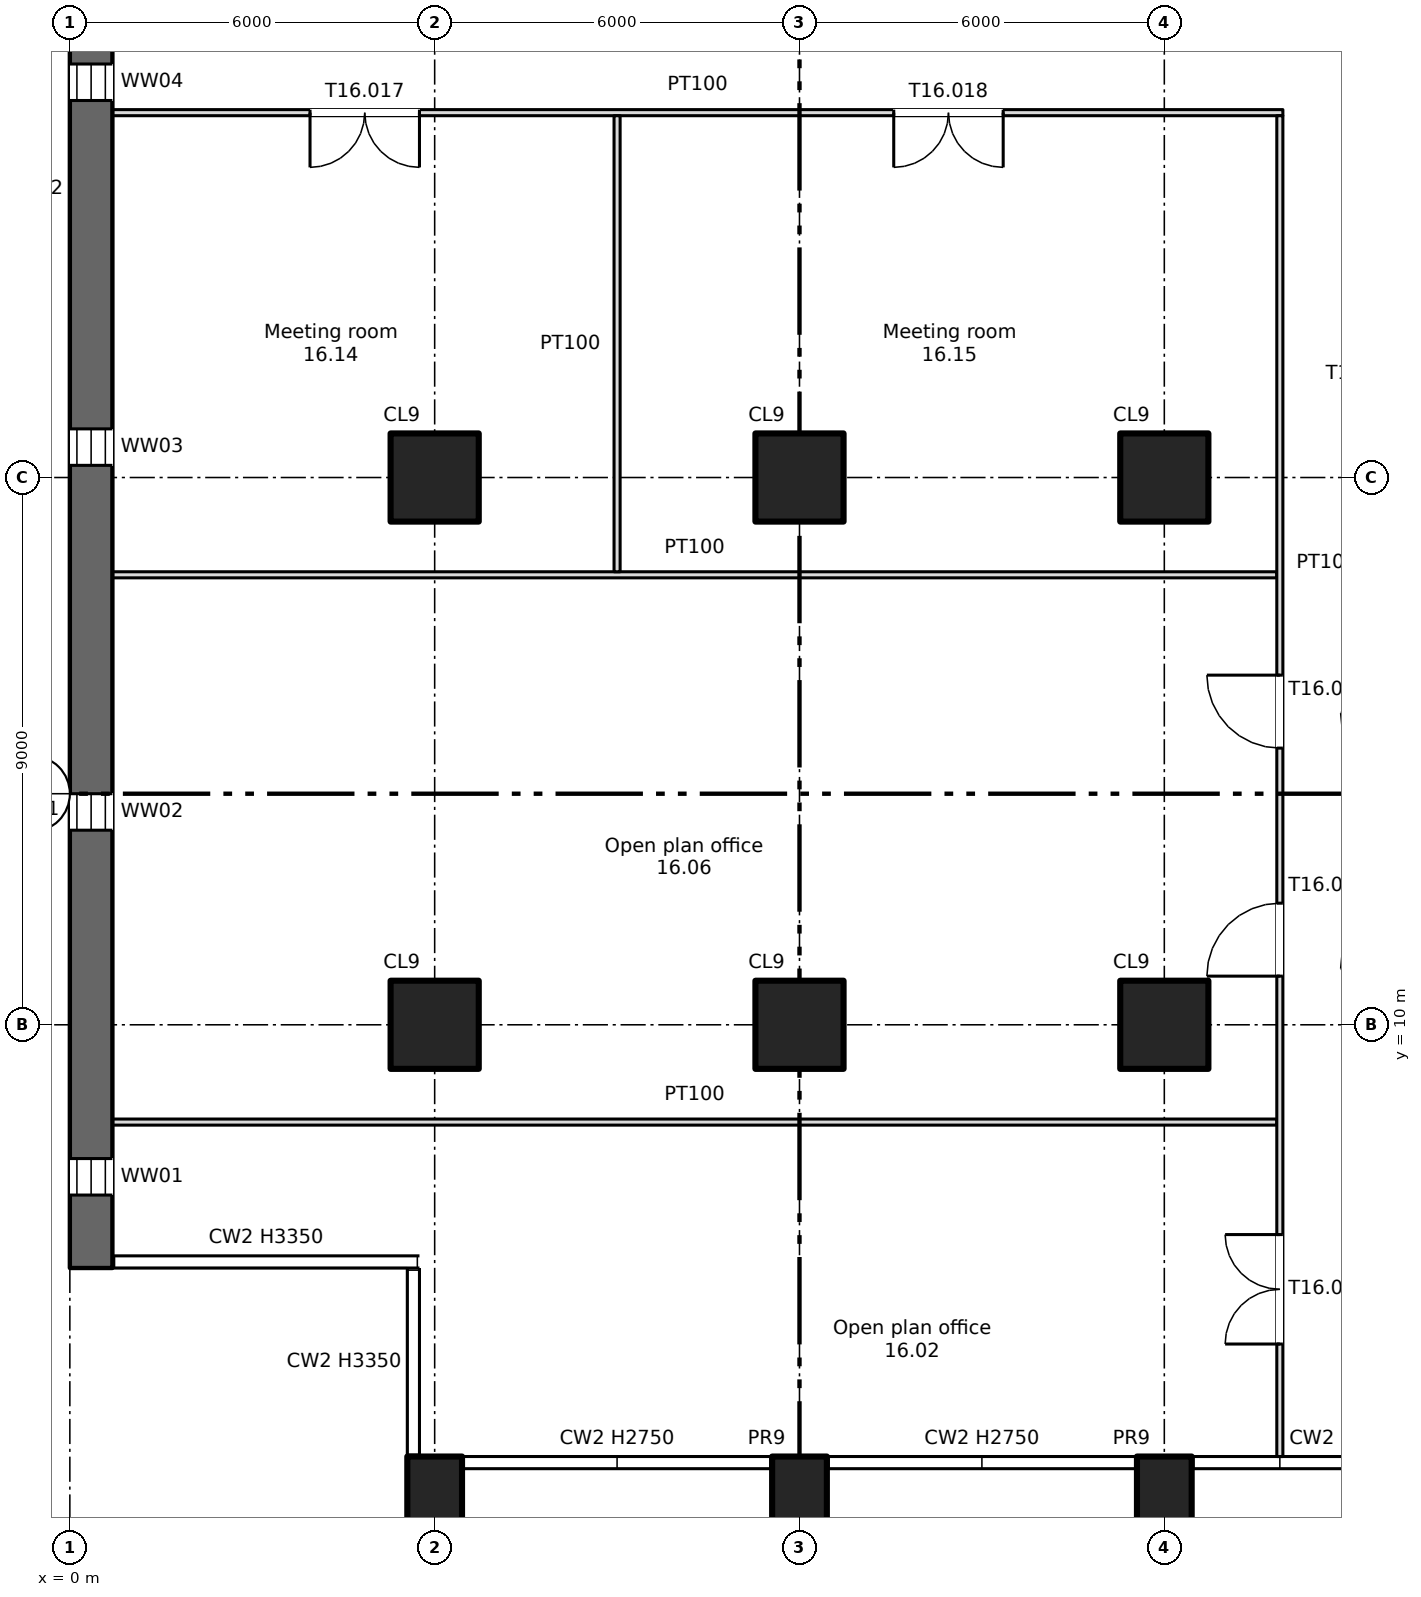
"""IFC4 building model, lengths in metres.
Left out: names, types, materials, properties, quantities, classifications, styles, units other than length and angle.
Written with IfcOpenShell. Run it as: python <this file> out.ifc"""

import sys

from ifc_helpers import new_model, si_unit, direction, frame, frame_2d, origin, origin_2d, place, context, subcontext, project, spatial, rectangle, extrude, element, fill, save


model = new_model("IFC4")
c1 = context("Model", 3, precision=1e-05, world=origin(), true_north=direction((0.0, 1.0)))
c2 = subcontext(c1, "Body", "Model", "MODEL_VIEW")
j1 = project(units=[si_unit("LENGTHUNIT", "METRE"), si_unit("PLANEANGLEUNIT", "RADIAN")], contexts=[c1])
p1 = place(None, origin())
s1 = spatial("IfcSite", under=j1, at=p1, CompositionType="ELEMENT")
p2 = place(p1, origin())
s2 = spatial("IfcBuilding", under=s1, at=p2, CompositionType="ELEMENT")
p3 = place(p2, frame((0.0, 0.0, 98.75)))
s3 = spatial("IfcBuildingStorey", under=s2, at=p3, CompositionType="ELEMENT", Elevation=98.75)
for number, where, z_axis, x_axis in (
    (1, (6.0, 2.2, -0.4), (0.0, 0.0, 1.0), (1.0, 0.0, 0.0)),
    (2, (12.0, 2.2, -0.4), (0.0, 0.0, 1.0), (1.0, 0.0, 0.0)),
    (3, (18.0, 2.2, -0.4), (0.0, 0.0, 1.0), (1.0, 0.0, 0.0)),
):
    element("IfcColumn", number, at=place(p3, frame(where, z_axis=z_axis, x_axis=x_axis)), inside=s3, PredefinedType="COLUMN", context=c2, shape_type="SweptSolid", body=[
        extrude(rectangle(XDim=0.9, YDim=1.4, at=origin_2d()), origin(), (0.0, 0.0, 1.0), 3.75),
    ])
for number, where, z_axis, x_axis in (
    (4, (6.0, 10.0, 0.0), (0.0, 0.0, 1.0), (1.0, 0.0, 0.0)),
    (5, (6.0, 19.0, 0.0), (0.0, 0.0, 1.0), (1.0, 0.0, 0.0)),
    (6, (12.0, 10.0, 0.0), (0.0, 0.0, 1.0), (1.0, 0.0, 0.0)),
    (7, (12.0, 19.0, 0.0), (0.0, 0.0, 1.0), (1.0, 0.0, 0.0)),
    (8, (18.0, 10.0, 0.0), (0.0, 0.0, 1.0), (1.0, 0.0, 0.0)),
    (9, (18.0, 19.0, 0.0), (0.0, 0.0, 1.0), (1.0, 0.0, 0.0)),
):
    element("IfcColumn", number, at=place(p3, frame(where, z_axis=z_axis, x_axis=x_axis)), inside=s3, PredefinedType="COLUMN", context=c2, shape_type="SweptSolid", body=[
        extrude(rectangle(XDim=1.45, YDim=1.45, at=origin_2d()), origin(), (0.0, 0.0, 1.0), 3.35),
    ])
p4 = place(p3, frame((0.35, 6.0, 0.0), z_axis=(0.0, 0.0, 1.0), x_axis=(0.0, 1.0, 0.0)))
e10 = element("IfcWall", 10, at=p4, inside=s3, PredefinedType="SHEAR", context=c2, shape_type="SweptSolid", body=[
    extrude(rectangle(XDim=35.5, YDim=0.7, at=frame_2d((17.75, 0.0))), origin(), (0.0, 0.0, 1.0), 3.35),
])
p5 = place(p4, frame((1.2, 0.0, 0.6)))
e11 = element("IfcOpeningElement", 11, at=p5, cuts=e10, PredefinedType="OPENING", context=c2, shape_type="SweptSolid", body=[
    extrude(rectangle(XDim=0.6, YDim=2.4, at=frame_2d((0.3, 1.2))), frame((0.0, 0.36, 0.0), z_axis=(0.0, -1.0, 0.0), x_axis=(1.0, 0.0, 0.0)), (0.0, 0.0, 1.0), 0.72),
])
p6 = place(p4, frame((7.2, 0.0, 0.6)))
e12 = element("IfcOpeningElement", 12, at=p6, cuts=e10, PredefinedType="OPENING", context=c2, shape_type="SweptSolid", body=[
    extrude(rectangle(XDim=0.6, YDim=2.4, at=frame_2d((0.3, 1.2))), frame((0.0, 0.36, 0.0), z_axis=(0.0, -1.0, 0.0), x_axis=(1.0, 0.0, 0.0)), (0.0, 0.0, 1.0), 0.72),
])
p7 = place(p4, frame((13.2, 0.0, 0.6)))
e13 = element("IfcOpeningElement", 13, at=p7, cuts=e10, PredefinedType="OPENING", context=c2, shape_type="SweptSolid", body=[
    extrude(rectangle(XDim=0.6, YDim=2.4, at=frame_2d((0.3, 1.2))), frame((0.0, 0.36, 0.0), z_axis=(0.0, -1.0, 0.0), x_axis=(1.0, 0.0, 0.0)), (0.0, 0.0, 1.0), 0.72),
])
p8 = place(p4, frame((19.2, 0.0, 0.6)))
e14 = element("IfcOpeningElement", 14, at=p8, cuts=e10, PredefinedType="OPENING", context=c2, shape_type="SweptSolid", body=[
    extrude(rectangle(XDim=0.6, YDim=2.4, at=frame_2d((0.3, 1.2))), frame((0.0, 0.36, 0.0), z_axis=(0.0, -1.0, 0.0), x_axis=(1.0, 0.0, 0.0)), (0.0, 0.0, 1.0), 0.72),
])
p9 = place(p4, frame((25.2, 0.0, 0.6)))
e15 = element("IfcOpeningElement", 15, at=p9, cuts=e10, PredefinedType="OPENING", context=c2, shape_type="SweptSolid", body=[
    extrude(rectangle(XDim=0.6, YDim=2.4, at=frame_2d((0.3, 1.2))), frame((0.0, 0.36, 0.0), z_axis=(0.0, -1.0, 0.0), x_axis=(1.0, 0.0, 0.0)), (0.0, 0.0, 1.0), 0.72),
])
p10 = place(p4, frame((31.2, 0.0, 0.6)))
e16 = element("IfcOpeningElement", 16, at=p10, cuts=e10, PredefinedType="OPENING", context=c2, shape_type="SweptSolid", body=[
    extrude(rectangle(XDim=0.6, YDim=2.4, at=frame_2d((0.3, 1.2))), frame((0.0, 0.36, 0.0), z_axis=(0.0, -1.0, 0.0), x_axis=(1.0, 0.0, 0.0)), (0.0, 0.0, 1.0), 0.72),
])
for number, where, z_axis, x_axis in (
    (17, (0.7, 8.4, 0.0), (0.0, 0.0, 1.0), (1.0, 0.0, 0.0)),
    (18, (0.7, 17.4, 0.0), (0.0, 0.0, 1.0), (1.0, 0.0, 0.0)),
):
    element("IfcWall", number, at=place(p3, frame(where, z_axis=z_axis, x_axis=x_axis)), inside=s3, PredefinedType="PARTITIONING", context=c2, shape_type="SweptSolid", body=[
        extrude(rectangle(XDim=19.15, YDim=0.1, at=frame_2d((9.575, 0.0))), origin(), (0.0, 0.0, 1.0), 3.35),
    ])
p11 = place(p3, frame((0.7, 25.0, 0.0), z_axis=(0.0, 0.0, 1.0), x_axis=(1.0, 0.0, 0.0)))
e19 = element("IfcWall", 19, at=p11, inside=s3, PredefinedType="PARTITIONING", context=c2, shape_type="SweptSolid", body=[
    extrude(rectangle(XDim=19.25, YDim=0.1, at=frame_2d((9.625, 0.0))), origin(), (0.0, 0.0, 1.0), 3.35),
])
p12 = place(p11, frame((3.25, 0.0, 0.0)))
e20 = element("IfcOpeningElement", 20, at=p12, cuts=e19, PredefinedType="OPENING", context=c2, shape_type="SweptSolid", body=[
    extrude(rectangle(XDim=1.8, YDim=2.1, at=frame_2d((0.9, 1.05))), frame((0.0, 0.06, 0.0), z_axis=(0.0, -1.0, 0.0), x_axis=(1.0, 0.0, 0.0)), (0.0, 0.0, 1.0), 0.12),
])
p13 = place(p11, frame((12.85, 0.0, 0.0)))
e21 = element("IfcOpeningElement", 21, at=p13, cuts=e19, PredefinedType="OPENING", context=c2, shape_type="SweptSolid", body=[
    extrude(rectangle(XDim=1.8, YDim=2.1, at=frame_2d((0.9, 1.05))), frame((0.0, 0.06, 0.0), z_axis=(0.0, -1.0, 0.0), x_axis=(1.0, 0.0, 0.0)), (0.0, 0.0, 1.0), 0.12),
])
p14 = place(p3, frame((9.0, 17.45, 0.0), z_axis=(0.0, 0.0, 1.0), x_axis=(0.0, 1.0, 0.0)))
e22 = element("IfcWall", 22, at=p14, inside=s3, PredefinedType="PARTITIONING", context=c2, shape_type="SweptSolid", body=[
    extrude(rectangle(XDim=7.5, YDim=0.1, at=frame_2d((3.75, 0.0))), origin(), (0.0, 0.0, 1.0), 3.35),
])
p15 = place(p3, frame((19.9, 2.9, 0.0), z_axis=(0.0, 0.0, 1.0), x_axis=(0.0, 1.0, 0.0)))
e23 = element("IfcWall", 23, at=p15, inside=s3, PredefinedType="PARTITIONING", context=c2, shape_type="SweptSolid", body=[
    extrude(rectangle(XDim=22.05, YDim=0.1, at=frame_2d((11.025, 0.0))), origin(), (0.0, 0.0, 1.0), 3.35),
])
p16 = place(p15, frame((1.85, 0.0, 0.0)))
e24 = element("IfcOpeningElement", 24, at=p16, cuts=e23, PredefinedType="OPENING", context=c2, shape_type="SweptSolid", body=[
    extrude(rectangle(XDim=1.8, YDim=2.1, at=frame_2d((0.9, 1.05))), frame((0.0, 0.06, 0.0), z_axis=(0.0, -1.0, 0.0), x_axis=(1.0, 0.0, 0.0)), (0.0, 0.0, 1.0), 0.12),
])
p17 = place(p15, frame((7.9, 0.0, 0.0)))
e25 = element("IfcOpeningElement", 25, at=p17, cuts=e23, PredefinedType="OPENING", context=c2, shape_type="SweptSolid", body=[
    extrude(rectangle(XDim=1.2, YDim=2.1, at=frame_2d((0.6, 1.05))), frame((0.0, 0.06, 0.0), z_axis=(0.0, -1.0, 0.0), x_axis=(1.0, 0.0, 0.0)), (0.0, 0.0, 1.0), 0.12),
])
p18 = place(p15, frame((11.65, 0.0, 0.0)))
e26 = element("IfcOpeningElement", 26, at=p18, cuts=e23, PredefinedType="OPENING", context=c2, shape_type="SweptSolid", body=[
    extrude(rectangle(XDim=1.2, YDim=2.1, at=frame_2d((0.6, 1.05))), frame((0.0, 0.06, 0.0), z_axis=(0.0, -1.0, 0.0), x_axis=(1.0, 0.0, 0.0)), (0.0, 0.0, 1.0), 0.12),
])
p19 = place(p5, origin())
e27 = element("IfcWindow", 27, at=p19, inside=s3, PartitioningType="SINGLE_PANEL", PredefinedType="WINDOW", context=c2, shape_type="SweptSolid", body=[
    extrude(rectangle(XDim=0.6, YDim=2.4, at=frame_2d((0.3, 1.2))), frame((0.0, 0.03, 0.0), z_axis=(0.0, -1.0, 0.0), x_axis=(1.0, 0.0, 0.0)), (0.0, 0.0, 1.0), 0.06),
])
fill(e11, e27)
p20 = place(p6, origin())
e28 = element("IfcWindow", 28, at=p20, inside=s3, PartitioningType="SINGLE_PANEL", PredefinedType="WINDOW", context=c2, shape_type="SweptSolid", body=[
    extrude(rectangle(XDim=0.6, YDim=2.4, at=frame_2d((0.3, 1.2))), frame((0.0, 0.03, 0.0), z_axis=(0.0, -1.0, 0.0), x_axis=(1.0, 0.0, 0.0)), (0.0, 0.0, 1.0), 0.06),
])
fill(e12, e28)
p21 = place(p7, origin())
e29 = element("IfcWindow", 29, at=p21, inside=s3, PartitioningType="SINGLE_PANEL", PredefinedType="WINDOW", context=c2, shape_type="SweptSolid", body=[
    extrude(rectangle(XDim=0.6, YDim=2.4, at=frame_2d((0.3, 1.2))), frame((0.0, 0.03, 0.0), z_axis=(0.0, -1.0, 0.0), x_axis=(1.0, 0.0, 0.0)), (0.0, 0.0, 1.0), 0.06),
])
fill(e13, e29)
p22 = place(p8, origin())
e30 = element("IfcWindow", 30, at=p22, inside=s3, PartitioningType="SINGLE_PANEL", PredefinedType="WINDOW", context=c2, shape_type="SweptSolid", body=[
    extrude(rectangle(XDim=0.6, YDim=2.4, at=frame_2d((0.3, 1.2))), frame((0.0, 0.03, 0.0), z_axis=(0.0, -1.0, 0.0), x_axis=(1.0, 0.0, 0.0)), (0.0, 0.0, 1.0), 0.06),
])
fill(e14, e30)
p23 = place(p16, origin())
e31 = element("IfcDoor", 31, at=p23, inside=s3, OperationType="DOUBLE_DOOR_SINGLE_SWING", PredefinedType="DOOR", context=c2, shape_type="SweptSolid", body=[
    extrude(rectangle(XDim=1.8, YDim=2.1, at=frame_2d((0.9, 1.05))), frame((0.0, 0.025, 0.0), z_axis=(0.0, -1.0, 0.0), x_axis=(1.0, 0.0, 0.0)), (0.0, 0.0, 1.0), 0.05),
])
fill(e24, e31)
p24 = place(p17, origin())
e32 = element("IfcDoor", 32, at=p24, inside=s3, OperationType="SINGLE_SWING_LEFT", PredefinedType="DOOR", context=c2, shape_type="SweptSolid", body=[
    extrude(rectangle(XDim=1.2, YDim=2.1, at=frame_2d((0.6, 1.05))), frame((0.0, 0.025, 0.0), z_axis=(0.0, -1.0, 0.0), x_axis=(1.0, 0.0, 0.0)), (0.0, 0.0, 1.0), 0.05),
])
fill(e25, e32)
p25 = place(p18, origin())
e33 = element("IfcDoor", 33, at=p25, inside=s3, OperationType="SINGLE_SWING_RIGHT", PredefinedType="DOOR", context=c2, shape_type="SweptSolid", body=[
    extrude(rectangle(XDim=1.2, YDim=2.1, at=frame_2d((0.6, 1.05))), frame((0.0, 0.025, 0.0), z_axis=(0.0, -1.0, 0.0), x_axis=(1.0, 0.0, 0.0)), (0.0, 0.0, 1.0), 0.05),
])
fill(e26, e33)
p26 = place(p12, origin())
e34 = element("IfcDoor", 34, at=p26, inside=s3, OperationType="DOUBLE_DOOR_SINGLE_SWING", PredefinedType="DOOR", context=c2, shape_type="SweptSolid", body=[
    extrude(rectangle(XDim=1.8, YDim=2.1, at=frame_2d((0.9, 1.05))), frame((0.0, 0.025, 0.0), z_axis=(0.0, -1.0, 0.0), x_axis=(1.0, 0.0, 0.0)), (0.0, 0.0, 1.0), 0.05),
])
fill(e20, e34)
p27 = place(p13, origin())
e35 = element("IfcDoor", 35, at=p27, inside=s3, OperationType="DOUBLE_DOOR_SINGLE_SWING", PredefinedType="DOOR", context=c2, shape_type="SweptSolid", body=[
    extrude(rectangle(XDim=1.8, YDim=2.1, at=frame_2d((0.9, 1.05))), frame((0.0, 0.025, 0.0), z_axis=(0.0, -1.0, 0.0), x_axis=(1.0, 0.0, 0.0)), (0.0, 0.0, 1.0), 0.05),
])
fill(e21, e35)
save(model, sys.argv[1])
